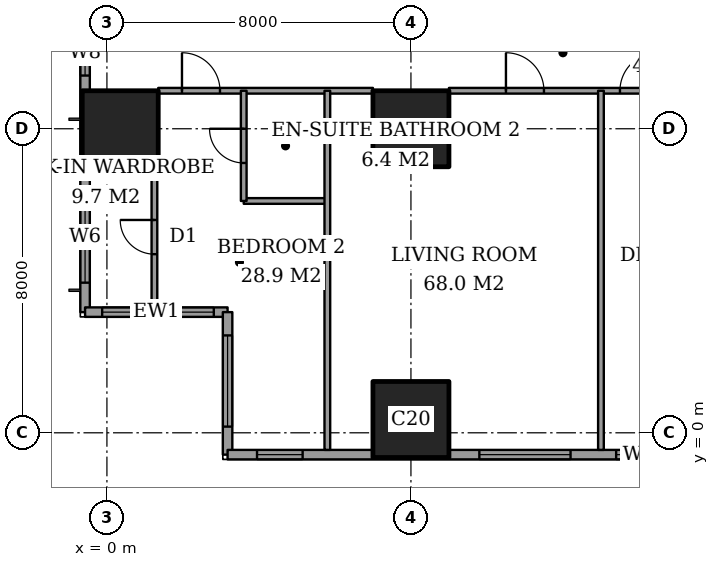
"""IFC4 building model, lengths in metres.
Left out: names, types, materials, properties, quantities, classifications, styles, units other than length and angle.
Written with IfcOpenShell. Run it as: python <this file> out.ifc"""

import sys

from ifc_helpers import new_model, si_unit, direction, frame, frame_2d, origin, origin_2d, place, context, subcontext, project, spatial, rectangle, extrude, element, fill, save


model = new_model("IFC4")
c1 = context("Model", 3, precision=1e-05, world=origin(), true_north=direction((0.0, 1.0)))
c2 = subcontext(c1, "Body", "Model", "MODEL_VIEW")
j1 = project(units=[si_unit("LENGTHUNIT", "METRE"), si_unit("PLANEANGLEUNIT", "RADIAN")], contexts=[c1])
p1 = place(None, origin())
s1 = spatial("IfcSite", under=j1, at=p1, CompositionType="ELEMENT")
p2 = place(p1, origin())
s2 = spatial("IfcBuilding", under=s1, at=p2, CompositionType="ELEMENT")
p3 = place(p2, frame((0.0, 0.0, 69.2)))
s3 = spatial("IfcBuildingStorey", under=s2, at=p3, CompositionType="ELEMENT", Elevation=69.2)
for number, where, z_axis, x_axis in (
    (1, (0.35, 8.0, 0.0), (0.0, 0.0, 1.0), (1.0, 0.0, 0.0)),
    (2, (8.0, 0.35, 0.0), (0.0, 0.0, 1.0), (1.0, 0.0, 0.0)),
    (3, (8.0, 8.0, 0.0), (0.0, 0.0, 1.0), (1.0, 0.0, 0.0)),
):
    element("IfcColumn", number, at=place(p3, frame(where, z_axis=z_axis, x_axis=x_axis)), inside=s3, PredefinedType="COLUMN", context=c2, shape_type="SweptSolid", body=[
        extrude(rectangle(XDim=2.0, YDim=2.0, at=origin_2d()), origin(), (0.0, 0.0, 1.0), 3.6),
    ])
p4 = place(p3, frame((-0.575, 44.825, 0.0), z_axis=(0.0, 0.0, 1.0), x_axis=(0.0, -1.0, 0.0)))
e4 = element("IfcWall", 4, at=p4, inside=s3, PredefinedType="SOLIDWALL", context=c2, shape_type="SweptSolid", body=[
    extrude(rectangle(XDim=41.65, YDim=0.25, at=frame_2d((20.825, 0.0))), origin(), (0.0, 0.0, 1.0), 3.6),
])
p5 = place(p4, frame((0.775, 0.0, 0.6)))
e5 = element("IfcOpeningElement", 5, at=p5, cuts=e4, PredefinedType="OPENING", context=c2, shape_type="SweptSolid", body=[
    extrude(rectangle(XDim=2.4, YDim=2.0, at=frame_2d((1.2, 1.0))), frame((0.0, 0.135, 0.0), z_axis=(0.0, -1.0, 0.0), x_axis=(1.0, 0.0, 0.0)), (0.0, 0.0, 1.0), 0.27),
])
p6 = place(p4, frame((6.1, 0.0, 0.6)))
e6 = element("IfcOpeningElement", 6, at=p6, cuts=e4, PredefinedType="OPENING", context=c2, shape_type="SweptSolid", body=[
    extrude(rectangle(XDim=1.2, YDim=2.0, at=frame_2d((0.6, 1.0))), frame((0.0, 0.135, 0.0), z_axis=(0.0, -1.0, 0.0), x_axis=(1.0, 0.0, 0.0)), (0.0, 0.0, 1.0), 0.27),
])
p7 = place(p4, frame((8.425, 0.0, 0.6)))
e7 = element("IfcOpeningElement", 7, at=p7, cuts=e4, PredefinedType="OPENING", context=c2, shape_type="SweptSolid", body=[
    extrude(rectangle(XDim=2.4, YDim=2.0, at=frame_2d((1.2, 1.0))), frame((0.0, 0.135, 0.0), z_axis=(0.0, -1.0, 0.0), x_axis=(1.0, 0.0, 0.0)), (0.0, 0.0, 1.0), 0.27),
])
p8 = place(p4, frame((15.625, 0.0, 0.6)))
e8 = element("IfcOpeningElement", 8, at=p8, cuts=e4, PredefinedType="OPENING", context=c2, shape_type="SweptSolid", body=[
    extrude(rectangle(XDim=2.4, YDim=2.0, at=frame_2d((1.2, 1.0))), frame((0.0, 0.135, 0.0), z_axis=(0.0, -1.0, 0.0), x_axis=(1.0, 0.0, 0.0)), (0.0, 0.0, 1.0), 0.27),
])
p9 = place(p4, frame((23.625, 0.0, 0.6)))
e9 = element("IfcOpeningElement", 9, at=p9, cuts=e4, PredefinedType="OPENING", context=c2, shape_type="SweptSolid", body=[
    extrude(rectangle(XDim=2.4, YDim=2.0, at=frame_2d((1.2, 1.0))), frame((0.0, 0.135, 0.0), z_axis=(0.0, -1.0, 0.0), x_axis=(1.0, 0.0, 0.0)), (0.0, 0.0, 1.0), 0.27),
])
p10 = place(p4, frame((30.625, 0.0, 0.6)))
e10 = element("IfcOpeningElement", 10, at=p10, cuts=e4, PredefinedType="OPENING", context=c2, shape_type="SweptSolid", body=[
    extrude(rectangle(XDim=2.4, YDim=2.0, at=frame_2d((1.2, 1.0))), frame((0.0, 0.135, 0.0), z_axis=(0.0, -1.0, 0.0), x_axis=(1.0, 0.0, 0.0)), (0.0, 0.0, 1.0), 0.27),
])
p11 = place(p4, frame((34.225, 0.0, 0.6)))
e11 = element("IfcOpeningElement", 11, at=p11, cuts=e4, PredefinedType="OPENING", context=c2, shape_type="SweptSolid", body=[
    extrude(rectangle(XDim=1.2, YDim=2.0, at=frame_2d((0.6, 1.0))), frame((0.0, 0.135, 0.0), z_axis=(0.0, -1.0, 0.0), x_axis=(1.0, 0.0, 0.0)), (0.0, 0.0, 1.0), 0.27),
])
p12 = place(p4, frame((38.475, 0.0, 0.6)))
e12 = element("IfcOpeningElement", 12, at=p12, cuts=e4, PredefinedType="OPENING", context=c2, shape_type="SweptSolid", body=[
    extrude(rectangle(XDim=2.4, YDim=2.0, at=frame_2d((1.2, 1.0))), frame((0.0, 0.135, 0.0), z_axis=(0.0, -1.0, 0.0), x_axis=(1.0, 0.0, 0.0)), (0.0, 0.0, 1.0), 0.27),
])
p13 = place(p3, frame((-0.575, 3.175, 0.0), z_axis=(0.0, 0.0, 1.0), x_axis=(1.0, 0.0, 0.0)))
e13 = element("IfcWall", 13, at=p13, inside=s3, PredefinedType="SOLIDWALL", context=c2, shape_type="SweptSolid", body=[
    extrude(rectangle(XDim=3.75, YDim=0.25, at=frame_2d((1.875, 0.0))), origin(), (0.0, 0.0, 1.0), 3.6),
])
p14 = place(p13, frame((0.45, 0.0, 0.6)))
e14 = element("IfcOpeningElement", 14, at=p14, cuts=e13, PredefinedType="OPENING", context=c2, shape_type="SweptSolid", body=[
    extrude(rectangle(XDim=1.2, YDim=2.0, at=frame_2d((0.6, 1.0))), frame((0.0, 0.135, 0.0), z_axis=(0.0, -1.0, 0.0), x_axis=(1.0, 0.0, 0.0)), (0.0, 0.0, 1.0), 0.27),
])
p15 = place(p13, frame((2.188, 0.0, 0.6)))
e15 = element("IfcOpeningElement", 15, at=p15, cuts=e13, PredefinedType="OPENING", context=c2, shape_type="SweptSolid", body=[
    extrude(rectangle(XDim=1.2, YDim=2.0, at=frame_2d((0.6, 1.0))), frame((0.0, 0.135, 0.0), z_axis=(0.0, -1.0, 0.0), x_axis=(1.0, 0.0, 0.0)), (0.0, 0.0, 1.0), 0.27),
])
p16 = place(p3, frame((3.175, 3.175, 0.0), z_axis=(0.0, 0.0, 1.0), x_axis=(0.0, -1.0, 0.0)))
e16 = element("IfcWall", 16, at=p16, inside=s3, PredefinedType="SOLIDWALL", context=c2, shape_type="SweptSolid", body=[
    extrude(rectangle(XDim=3.75, YDim=0.25, at=frame_2d((1.875, 0.0))), origin(), (0.0, 0.0, 1.0), 3.6),
])
p17 = place(p16, frame((0.613, 0.0, 0.6)))
e17 = element("IfcOpeningElement", 17, at=p17, cuts=e16, PredefinedType="OPENING", context=c2, shape_type="SweptSolid", body=[
    extrude(rectangle(XDim=2.4, YDim=2.0, at=frame_2d((1.2, 1.0))), frame((0.0, 0.135, 0.0), z_axis=(0.0, -1.0, 0.0), x_axis=(1.0, 0.0, 0.0)), (0.0, 0.0, 1.0), 0.27),
])
p18 = place(p3, frame((3.175, -0.575, 0.0), z_axis=(0.0, 0.0, 1.0), x_axis=(1.0, 0.0, 0.0)))
e18 = element("IfcWall", 18, at=p18, inside=s3, PredefinedType="SOLIDWALL", context=c2, shape_type="SweptSolid", body=[
    extrude(rectangle(XDim=21.4, YDim=0.25, at=frame_2d((10.7, 0.0))), origin(), (0.0, 0.0, 1.0), 3.6),
])
p19 = place(p18, frame((0.775, 0.0, 0.6)))
e19 = element("IfcOpeningElement", 19, at=p19, cuts=e18, PredefinedType="OPENING", context=c2, shape_type="SweptSolid", body=[
    extrude(rectangle(XDim=1.2, YDim=2.0, at=frame_2d((0.6, 1.0))), frame((0.0, 0.135, 0.0), z_axis=(0.0, -1.0, 0.0), x_axis=(1.0, 0.0, 0.0)), (0.0, 0.0, 1.0), 0.27),
])
p20 = place(p18, frame((6.625, 0.0, 0.6)))
e20 = element("IfcOpeningElement", 20, at=p20, cuts=e18, PredefinedType="OPENING", context=c2, shape_type="SweptSolid", body=[
    extrude(rectangle(XDim=2.4, YDim=2.0, at=frame_2d((1.2, 1.0))), frame((0.0, 0.135, 0.0), z_axis=(0.0, -1.0, 0.0), x_axis=(1.0, 0.0, 0.0)), (0.0, 0.0, 1.0), 0.27),
])
p21 = place(p18, frame((10.225, 0.0, 0.6)))
e21 = element("IfcOpeningElement", 21, at=p21, cuts=e18, PredefinedType="OPENING", context=c2, shape_type="SweptSolid", body=[
    extrude(rectangle(XDim=1.2, YDim=2.0, at=frame_2d((0.6, 1.0))), frame((0.0, 0.135, 0.0), z_axis=(0.0, -1.0, 0.0), x_axis=(1.0, 0.0, 0.0)), (0.0, 0.0, 1.0), 0.27),
])
p22 = place(p18, frame((15.875, 0.0, 0.6)))
e22 = element("IfcOpeningElement", 22, at=p22, cuts=e18, PredefinedType="OPENING", context=c2, shape_type="SweptSolid", body=[
    extrude(rectangle(XDim=2.4, YDim=2.0, at=frame_2d((1.2, 1.0))), frame((0.0, 0.135, 0.0), z_axis=(0.0, -1.0, 0.0), x_axis=(1.0, 0.0, 0.0)), (0.0, 0.0, 1.0), 0.27),
])
p23 = place(p3, frame((3.6, 6.1, 0.0), z_axis=(0.0, 0.0, 1.0), x_axis=(1.0, 0.0, 0.0)))
e23 = element("IfcWall", 23, at=p23, inside=s3, PredefinedType="PARTITIONING", context=c2, shape_type="SweptSolid", body=[
    extrude(rectangle(XDim=2.2, YDim=0.15, at=frame_2d((1.1, 0.0))), origin(), (0.0, 0.0, 1.0), 3.35),
])
p24 = place(p3, frame((1.35, 9.0, 0.0), z_axis=(0.0, 0.0, 1.0), x_axis=(1.0, 0.0, 0.0)))
e24 = element("IfcWall", 24, at=p24, inside=s3, PredefinedType="PARTITIONING", context=c2, shape_type="SweptSolid", body=[
    extrude(rectangle(XDim=5.65, YDim=0.15, at=frame_2d((2.825, 0.0))), origin(), (0.0, 0.0, 1.0), 3.35),
])
p25 = place(p24, frame((0.625, 0.0, 0.0)))
e25 = element("IfcOpeningElement", 25, at=p25, cuts=e24, PredefinedType="OPENING", context=c2, shape_type="SweptSolid", body=[
    extrude(rectangle(XDim=1.0, YDim=2.1, at=frame_2d((0.5, 1.05))), frame((0.0, 0.085, 0.0), z_axis=(0.0, -1.0, 0.0), x_axis=(1.0, 0.0, 0.0)), (0.0, 0.0, 1.0), 0.17),
])
p26 = place(p3, frame((9.0, 9.0, 0.0), z_axis=(0.0, 0.0, 1.0), x_axis=(1.0, 0.0, 0.0)))
e26 = element("IfcWall", 26, at=p26, inside=s3, PredefinedType="PARTITIONING", context=c2, shape_type="SweptSolid", body=[
    extrude(rectangle(XDim=6.0, YDim=0.15, at=frame_2d((3.0, 0.0))), origin(), (0.0, 0.0, 1.0), 3.35),
])
p27 = place(p26, frame((1.5, 0.0, 0.0)))
e27 = element("IfcOpeningElement", 27, at=p27, cuts=e26, PredefinedType="OPENING", context=c2, shape_type="SweptSolid", body=[
    extrude(rectangle(XDim=1.0, YDim=2.1, at=frame_2d((0.5, 1.05))), frame((0.0, 0.085, 0.0), z_axis=(0.0, -1.0, 0.0), x_axis=(1.0, 0.0, 0.0)), (0.0, 0.0, 1.0), 0.17),
])
p28 = place(p26, frame((4.5, 0.0, 0.0)))
e28 = element("IfcOpeningElement", 28, at=p28, cuts=e26, PredefinedType="OPENING", context=c2, shape_type="SweptSolid", body=[
    extrude(rectangle(XDim=1.0, YDim=2.1, at=frame_2d((0.5, 1.05))), frame((0.0, 0.085, 0.0), z_axis=(0.0, -1.0, 0.0), x_axis=(1.0, 0.0, 0.0)), (0.0, 0.0, 1.0), 0.17),
])
p29 = place(p3, frame((1.25, 3.3, 0.0), z_axis=(0.0, 0.0, 1.0), x_axis=(0.0, 1.0, 0.0)))
e29 = element("IfcWall", 29, at=p29, inside=s3, PredefinedType="PARTITIONING", context=c2, shape_type="SweptSolid", body=[
    extrude(rectangle(XDim=3.7, YDim=0.15, at=frame_2d((1.85, 0.0))), origin(), (0.0, 0.0, 1.0), 3.35),
])
p30 = place(p29, frame((1.4, 0.0, 0.0)))
e30 = element("IfcOpeningElement", 30, at=p30, cuts=e29, PredefinedType="OPENING", context=c2, shape_type="SweptSolid", body=[
    extrude(rectangle(XDim=0.9, YDim=2.1, at=frame_2d((0.45, 1.05))), frame((0.0, 0.085, 0.0), z_axis=(0.0, -1.0, 0.0), x_axis=(1.0, 0.0, 0.0)), (0.0, 0.0, 1.0), 0.17),
])
p31 = place(p3, frame((3.6, 6.1, 0.0), z_axis=(0.0, 0.0, 1.0), x_axis=(0.0, 1.0, 0.0)))
e31 = element("IfcWall", 31, at=p31, inside=s3, PredefinedType="PARTITIONING", context=c2, shape_type="SweptSolid", body=[
    extrude(rectangle(XDim=2.9, YDim=0.15, at=frame_2d((1.45, 0.0))), origin(), (0.0, 0.0, 1.0), 3.35),
])
p32 = place(p31, frame((1.0, 0.0, 0.0)))
e32 = element("IfcOpeningElement", 32, at=p32, cuts=e31, PredefinedType="OPENING", context=c2, shape_type="SweptSolid", body=[
    extrude(rectangle(XDim=0.9, YDim=2.1, at=frame_2d((0.45, 1.05))), frame((0.0, 0.085, 0.0), z_axis=(0.0, -1.0, 0.0), x_axis=(1.0, 0.0, 0.0)), (0.0, 0.0, 1.0), 0.17),
])
for number, where, z_axis, x_axis in (
    (33, (5.8, -0.45, 0.0), (0.0, 0.0, 1.0), (0.0, 1.0, 0.0)),
    (34, (13.0, -0.45, 0.0), (0.0, 0.0, 1.0), (0.0, 1.0, 0.0)),
):
    element("IfcWall", number, at=place(p3, frame(where, z_axis=z_axis, x_axis=x_axis)), inside=s3, PredefinedType="PARTITIONING", context=c2, shape_type="SweptSolid", body=[
        extrude(rectangle(XDim=9.45, YDim=0.15, at=frame_2d((4.725, 0.0))), origin(), (0.0, 0.0, 1.0), 3.35),
    ])
p33 = place(p11, origin())
e35 = element("IfcWindow", 35, at=p33, inside=s3, PartitioningType="SINGLE_PANEL", PredefinedType="WINDOW", context=c2, shape_type="SweptSolid", body=[
    extrude(rectangle(XDim=1.2, YDim=2.0, at=frame_2d((0.6, 1.0))), frame((0.0, 0.03, 0.0), z_axis=(0.0, -1.0, 0.0), x_axis=(1.0, 0.0, 0.0)), (0.0, 0.0, 1.0), 0.06),
])
fill(e11, e35)
p34 = place(p12, origin())
e36 = element("IfcWindow", 36, at=p34, inside=s3, PartitioningType="SINGLE_PANEL", PredefinedType="WINDOW", context=c2, shape_type="SweptSolid", body=[
    extrude(rectangle(XDim=2.4, YDim=2.0, at=frame_2d((1.2, 1.0))), frame((0.0, 0.03, 0.0), z_axis=(0.0, -1.0, 0.0), x_axis=(1.0, 0.0, 0.0)), (0.0, 0.0, 1.0), 0.06),
])
fill(e12, e36)
p35 = place(p14, origin())
e37 = element("IfcWindow", 37, at=p35, inside=s3, PartitioningType="SINGLE_PANEL", PredefinedType="WINDOW", context=c2, shape_type="SweptSolid", body=[
    extrude(rectangle(XDim=1.2, YDim=2.0, at=frame_2d((0.6, 1.0))), frame((0.0, 0.03, 0.0), z_axis=(0.0, -1.0, 0.0), x_axis=(1.0, 0.0, 0.0)), (0.0, 0.0, 1.0), 0.06),
])
fill(e14, e37)
p36 = place(p15, origin())
e38 = element("IfcWindow", 38, at=p36, inside=s3, PartitioningType="SINGLE_PANEL", PredefinedType="WINDOW", context=c2, shape_type="SweptSolid", body=[
    extrude(rectangle(XDim=1.2, YDim=2.0, at=frame_2d((0.6, 1.0))), frame((0.0, 0.03, 0.0), z_axis=(0.0, -1.0, 0.0), x_axis=(1.0, 0.0, 0.0)), (0.0, 0.0, 1.0), 0.06),
])
fill(e15, e38)
p37 = place(p17, origin())
e39 = element("IfcWindow", 39, at=p37, inside=s3, PartitioningType="SINGLE_PANEL", PredefinedType="WINDOW", context=c2, shape_type="SweptSolid", body=[
    extrude(rectangle(XDim=2.4, YDim=2.0, at=frame_2d((1.2, 1.0))), frame((0.0, 0.03, 0.0), z_axis=(0.0, -1.0, 0.0), x_axis=(1.0, 0.0, 0.0)), (0.0, 0.0, 1.0), 0.06),
])
fill(e17, e39)
p38 = place(p19, origin())
e40 = element("IfcWindow", 40, at=p38, inside=s3, PartitioningType="SINGLE_PANEL", PredefinedType="WINDOW", context=c2, shape_type="SweptSolid", body=[
    extrude(rectangle(XDim=1.2, YDim=2.0, at=frame_2d((0.6, 1.0))), frame((0.0, 0.03, 0.0), z_axis=(0.0, -1.0, 0.0), x_axis=(1.0, 0.0, 0.0)), (0.0, 0.0, 1.0), 0.06),
])
fill(e19, e40)
p39 = place(p20, origin())
e41 = element("IfcWindow", 41, at=p39, inside=s3, PartitioningType="SINGLE_PANEL", PredefinedType="WINDOW", context=c2, shape_type="SweptSolid", body=[
    extrude(rectangle(XDim=2.4, YDim=2.0, at=frame_2d((1.2, 1.0))), frame((0.0, 0.03, 0.0), z_axis=(0.0, -1.0, 0.0), x_axis=(1.0, 0.0, 0.0)), (0.0, 0.0, 1.0), 0.06),
])
fill(e20, e41)
p40 = place(p21, origin())
e42 = element("IfcWindow", 42, at=p40, inside=s3, PartitioningType="SINGLE_PANEL", PredefinedType="WINDOW", context=c2, shape_type="SweptSolid", body=[
    extrude(rectangle(XDim=1.2, YDim=2.0, at=frame_2d((0.6, 1.0))), frame((0.0, 0.03, 0.0), z_axis=(0.0, -1.0, 0.0), x_axis=(1.0, 0.0, 0.0)), (0.0, 0.0, 1.0), 0.06),
])
fill(e21, e42)
p41 = place(p30, origin())
e43 = element("IfcDoor", 43, at=p41, inside=s3, OperationType="SINGLE_SWING_LEFT", PredefinedType="DOOR", context=c2, shape_type="SweptSolid", body=[
    extrude(rectangle(XDim=0.9, YDim=2.1, at=frame_2d((0.45, 1.05))), frame((0.0, 0.025, 0.0), z_axis=(0.0, -1.0, 0.0), x_axis=(1.0, 0.0, 0.0)), (0.0, 0.0, 1.0), 0.05),
])
fill(e30, e43)
p42 = place(p32, origin())
e44 = element("IfcDoor", 44, at=p42, inside=s3, OperationType="SINGLE_SWING_LEFT", PredefinedType="DOOR", context=c2, shape_type="SweptSolid", body=[
    extrude(rectangle(XDim=0.9, YDim=2.1, at=frame_2d((0.45, 1.05))), frame((0.0, 0.025, 0.0), z_axis=(0.0, -1.0, 0.0), x_axis=(1.0, 0.0, 0.0)), (0.0, 0.0, 1.0), 0.05),
])
fill(e32, e44)
p43 = place(p25, origin())
e45 = element("IfcDoor", 45, at=p43, inside=s3, OperationType="SINGLE_SWING_RIGHT", PredefinedType="DOOR", context=c2, shape_type="SweptSolid", body=[
    extrude(rectangle(XDim=1.0, YDim=2.1, at=frame_2d((0.5, 1.05))), frame((0.0, 0.025, 0.0), z_axis=(0.0, -1.0, 0.0), x_axis=(1.0, 0.0, 0.0)), (0.0, 0.0, 1.0), 0.05),
])
fill(e25, e45)
p44 = place(p27, origin())
e46 = element("IfcDoor", 46, at=p44, inside=s3, OperationType="SINGLE_SWING_RIGHT", PredefinedType="DOOR", context=c2, shape_type="SweptSolid", body=[
    extrude(rectangle(XDim=1.0, YDim=2.1, at=frame_2d((0.5, 1.05))), frame((0.0, 0.025, 0.0), z_axis=(0.0, -1.0, 0.0), x_axis=(1.0, 0.0, 0.0)), (0.0, 0.0, 1.0), 0.05),
])
fill(e27, e46)
p45 = place(p28, origin())
e47 = element("IfcDoor", 47, at=p45, inside=s3, OperationType="SINGLE_SWING_LEFT", PredefinedType="DOOR", context=c2, shape_type="SweptSolid", body=[
    extrude(rectangle(XDim=1.0, YDim=2.1, at=frame_2d((0.5, 1.05))), frame((0.0, 0.025, 0.0), z_axis=(0.0, -1.0, 0.0), x_axis=(1.0, 0.0, 0.0)), (0.0, 0.0, 1.0), 0.05),
])
fill(e28, e47)
save(model, sys.argv[1])
